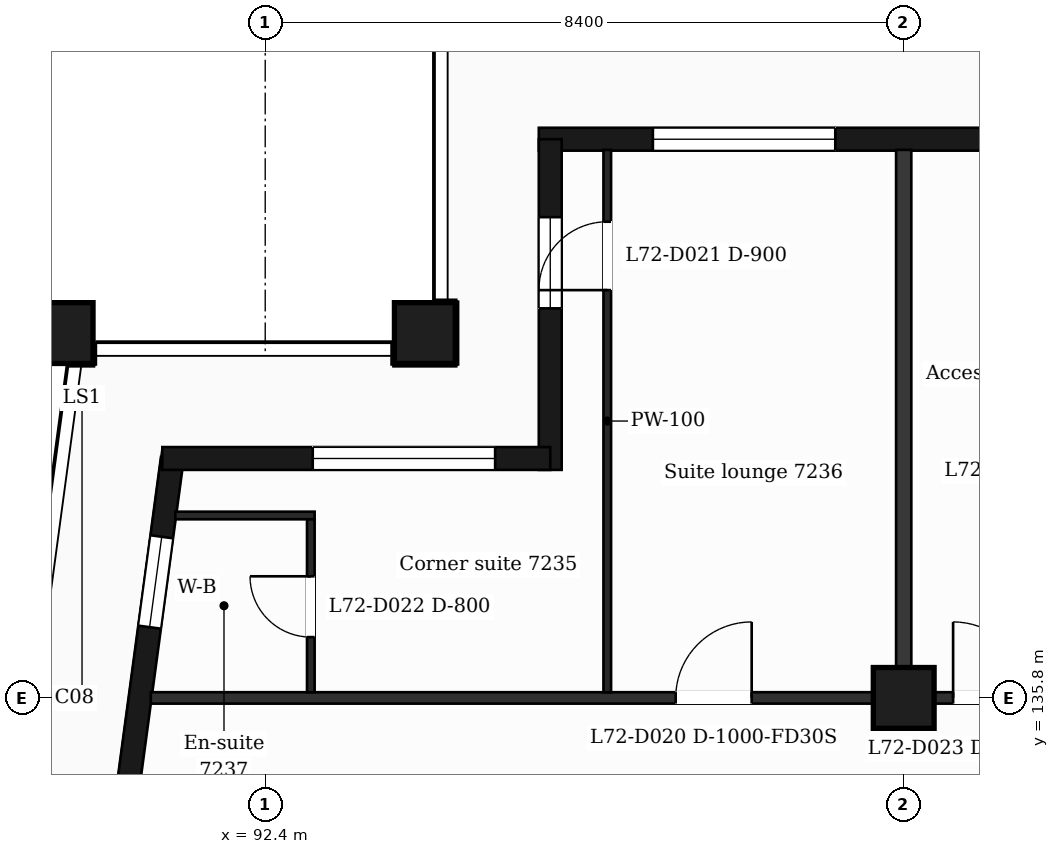
"""IFC4 building model, lengths in metres.
Left out: names, types, materials, properties, quantities, classifications, styles, units other than length and angle.
Written with IfcOpenShell. Run it as: python <this file> out.ifc"""

import sys

from ifc_helpers import new_model, si_unit, direction, frame, frame_2d, origin, origin_2d, place, context, subcontext, project, spatial, rectangle, extrude, element, fill, save


model = new_model("IFC4")
c1 = context("Model", 3, precision=1e-05, world=origin(), true_north=direction((0.0, 1.0)))
c2 = subcontext(c1, "Body", "Model", "MODEL_VIEW")
j1 = project(units=[si_unit("LENGTHUNIT", "METRE"), si_unit("PLANEANGLEUNIT", "RADIAN")], contexts=[c1])
p1 = place(None, origin())
s1 = spatial("IfcSite", under=j1, at=p1, CompositionType="ELEMENT")
p2 = place(p1, origin())
s2 = spatial("IfcBuilding", under=s1, at=p2, CompositionType="ELEMENT")
p3 = place(p2, frame((0.0, 0.0, 296.0)))
s3 = spatial("IfcBuildingStorey", under=s2, at=p3, CompositionType="ELEMENT", Elevation=296.0)
for number, where, z_axis, x_axis in (
    (1, (94.5, 140.6, 0.0), (0.0, 0.0, 1.0), (1.0, 0.0, 0.0)),
    (2, (89.735, 140.6, 0.0), (0.0, 0.0, 1.0), (1.0, 0.0, 0.0)),
    (3, (100.8, 135.8, 0.0), (0.0, 0.0, 1.0), (1.0, 0.0, 0.0)),
):
    element("IfcColumn", number, at=place(p3, frame(where, z_axis=z_axis, x_axis=x_axis)), inside=s3, PredefinedType="COLUMN", context=c2, shape_type="SweptSolid", body=[
        extrude(rectangle(XDim=0.8, YDim=0.8, at=origin_2d()), origin(), (0.0, 0.0, 1.0), 3.7),
    ])
p4 = place(p3, frame((91.177, 138.95, 0.0), z_axis=(0.0, 0.0, 1.0), x_axis=(-0.133426664613, -0.991058689065, 0.0)))
e4 = element("IfcWall", 4, at=p4, inside=s3, PredefinedType="SOLIDWALL", context=c2, shape_type="SweptSolid", body=[
    extrude(rectangle(XDim=6.609, YDim=0.3, at=frame_2d((3.305, 0.0))), origin(), (0.0, 0.0, 1.0), 3.38),
])
p5 = place(p4, frame((1.039, 0.0, 0.9)))
e5 = element("IfcOpeningElement", 5, at=p5, cuts=e4, PredefinedType="OPENING", context=c2, shape_type="SweptSolid", body=[
    extrude(rectangle(XDim=1.2, YDim=2.1, at=frame_2d((0.6, 1.05))), frame((0.0, 0.16, 0.0), z_axis=(0.0, -1.0, 0.0), x_axis=(1.0, 0.0, 0.0)), (0.0, 0.0, 1.0), 0.32),
])
p6 = place(p4, frame((4.294, 0.0, 0.0)))
e6 = element("IfcOpeningElement", 6, at=p6, cuts=e4, PredefinedType="OPENING", context=c2, shape_type="SweptSolid", body=[
    extrude(rectangle(XDim=1.2, YDim=2.4, at=frame_2d((0.6, 1.2))), frame((0.0, 0.16, 0.0), z_axis=(0.0, -1.0, 0.0), x_axis=(1.0, 0.0, 0.0)), (0.0, 0.0, 1.0), 0.32),
])
p7 = place(p3, frame((110.4, 143.15, 0.0), z_axis=(0.0, 0.0, 1.0), x_axis=(-1.0, 0.0, 0.0)))
e7 = element("IfcWall", 7, at=p7, inside=s3, PredefinedType="SOLIDWALL", context=c2, shape_type="SweptSolid", body=[
    extrude(rectangle(XDim=14.4, YDim=0.3, at=frame_2d((7.2, 0.0))), origin(), (0.0, 0.0, 1.0), 3.38),
])
p8 = place(p7, frame((2.7, 0.0, 0.9)))
e8 = element("IfcOpeningElement", 8, at=p8, cuts=e7, PredefinedType="OPENING", context=c2, shape_type="SweptSolid", body=[
    extrude(rectangle(XDim=1.2, YDim=2.1, at=frame_2d((0.6, 1.05))), frame((0.0, 0.16, 0.0), z_axis=(0.0, -1.0, 0.0), x_axis=(1.0, 0.0, 0.0)), (0.0, 0.0, 1.0), 0.32),
])
p9 = place(p7, frame((6.9, 0.0, 0.0)))
e9 = element("IfcOpeningElement", 9, at=p9, cuts=e7, PredefinedType="OPENING", context=c2, shape_type="SweptSolid", body=[
    extrude(rectangle(XDim=1.2, YDim=2.4, at=frame_2d((0.6, 1.2))), frame((0.0, 0.16, 0.0), z_axis=(0.0, -1.0, 0.0), x_axis=(1.0, 0.0, 0.0)), (0.0, 0.0, 1.0), 0.32),
])
p10 = place(p7, frame((10.5, 0.0, 0.9)))
e10 = element("IfcOpeningElement", 10, at=p10, cuts=e7, PredefinedType="OPENING", context=c2, shape_type="SweptSolid", body=[
    extrude(rectangle(XDim=2.4, YDim=2.1, at=frame_2d((1.2, 1.05))), frame((0.0, 0.16, 0.0), z_axis=(0.0, -1.0, 0.0), x_axis=(1.0, 0.0, 0.0)), (0.0, 0.0, 1.0), 0.32),
])
p11 = place(p3, frame((96.15, 143.15, 0.0), z_axis=(0.0, 0.0, 1.0), x_axis=(0.0, -1.0, 0.0)))
e11 = element("IfcWall", 11, at=p11, inside=s3, PredefinedType="SOLIDWALL", context=c2, shape_type="SweptSolid", body=[
    extrude(rectangle(XDim=4.35, YDim=0.3, at=frame_2d((2.175, 0.0))), origin(), (0.0, 0.0, 1.0), 3.38),
])
p12 = place(p11, frame((1.025, 0.0, 0.9)))
e12 = element("IfcOpeningElement", 12, at=p12, cuts=e11, PredefinedType="OPENING", context=c2, shape_type="SweptSolid", body=[
    extrude(rectangle(XDim=1.2, YDim=2.1, at=frame_2d((0.6, 1.05))), frame((0.0, 0.16, 0.0), z_axis=(0.0, -1.0, 0.0), x_axis=(1.0, 0.0, 0.0)), (0.0, 0.0, 1.0), 0.32),
])
p13 = place(p3, frame((96.15, 138.95, 0.0), z_axis=(0.0, 0.0, 1.0), x_axis=(-1.0, 0.0, 0.0)))
e13 = element("IfcWall", 13, at=p13, inside=s3, PredefinedType="SOLIDWALL", context=c2, shape_type="SweptSolid", body=[
    extrude(rectangle(XDim=5.104, YDim=0.3, at=frame_2d((2.552, 0.0))), origin(), (0.0, 0.0, 1.0), 3.38),
])
p14 = place(p13, frame((0.725, 0.0, 0.9)))
e14 = element("IfcOpeningElement", 14, at=p14, cuts=e13, PredefinedType="OPENING", context=c2, shape_type="SweptSolid", body=[
    extrude(rectangle(XDim=2.4, YDim=2.1, at=frame_2d((1.2, 1.05))), frame((0.0, 0.16, 0.0), z_axis=(0.0, -1.0, 0.0), x_axis=(1.0, 0.0, 0.0)), (0.0, 0.0, 1.0), 0.32),
])
p15 = place(p3, frame((90.895, 135.8, 0.0), z_axis=(0.0, 0.0, 1.0), x_axis=(1.0, 0.0, 0.0)))
e15 = element("IfcWall", 15, at=p15, inside=s3, PredefinedType="PARTITIONING", context=c2, shape_type="SweptSolid", body=[
    extrude(rectangle(XDim=45.011, YDim=0.15, at=frame_2d((22.505, 0.0))), origin(), (0.0, 0.0, 1.0), 3.38),
])
p16 = place(p15, frame((6.906, 0.0, 0.0)))
e16 = element("IfcOpeningElement", 16, at=p16, cuts=e15, PredefinedType="OPENING", context=c2, shape_type="SweptSolid", body=[
    extrude(rectangle(XDim=1.0, YDim=2.1, at=frame_2d((0.5, 1.05))), frame((0.0, 0.085, 0.0), z_axis=(0.0, -1.0, 0.0), x_axis=(1.0, 0.0, 0.0)), (0.0, 0.0, 1.0), 0.17),
])
p17 = place(p15, frame((10.555, 0.0, 0.0)))
e17 = element("IfcOpeningElement", 17, at=p17, cuts=e15, PredefinedType="OPENING", context=c2, shape_type="SweptSolid", body=[
    extrude(rectangle(XDim=1.0, YDim=2.1, at=frame_2d((0.5, 1.05))), frame((0.0, 0.085, 0.0), z_axis=(0.0, -1.0, 0.0), x_axis=(1.0, 0.0, 0.0)), (0.0, 0.0, 1.0), 0.17),
])
p18 = place(p15, frame((16.719, 0.0, 0.0)))
e18 = element("IfcOpeningElement", 18, at=p18, cuts=e15, PredefinedType="OPENING", context=c2, shape_type="SweptSolid", body=[
    extrude(rectangle(XDim=0.95, YDim=2.1, at=frame_2d((0.475, 1.05))), frame((0.0, 0.085, 0.0), z_axis=(0.0, -1.0, 0.0), x_axis=(1.0, 0.0, 0.0)), (0.0, 0.0, 1.0), 0.17),
])
p19 = place(p15, frame((21.281, 0.0, 0.0)))
e19 = element("IfcOpeningElement", 19, at=p19, cuts=e15, PredefinedType="OPENING", context=c2, shape_type="SweptSolid", body=[
    extrude(rectangle(XDim=0.95, YDim=2.1, at=frame_2d((0.475, 1.05))), frame((0.0, 0.085, 0.0), z_axis=(0.0, -1.0, 0.0), x_axis=(1.0, 0.0, 0.0)), (0.0, 0.0, 1.0), 0.17),
])
p20 = place(p15, frame((25.125, 0.0, 0.0)))
e20 = element("IfcOpeningElement", 20, at=p20, cuts=e15, PredefinedType="OPENING", context=c2, shape_type="SweptSolid", body=[
    extrude(rectangle(XDim=0.95, YDim=2.1, at=frame_2d((0.475, 1.05))), frame((0.0, 0.085, 0.0), z_axis=(0.0, -1.0, 0.0), x_axis=(1.0, 0.0, 0.0)), (0.0, 0.0, 1.0), 0.17),
])
p21 = place(p15, frame((27.393, 0.0, 0.0)))
e21 = element("IfcOpeningElement", 21, at=p21, cuts=e15, PredefinedType="OPENING", context=c2, shape_type="SweptSolid", body=[
    extrude(rectangle(XDim=0.95, YDim=2.1, at=frame_2d((0.475, 1.05))), frame((0.0, 0.085, 0.0), z_axis=(0.0, -1.0, 0.0), x_axis=(1.0, 0.0, 0.0)), (0.0, 0.0, 1.0), 0.17),
])
p22 = place(p15, frame((33.518, 0.0, 0.0)))
e22 = element("IfcOpeningElement", 22, at=p22, cuts=e15, PredefinedType="OPENING", context=c2, shape_type="SweptSolid", body=[
    extrude(rectangle(XDim=0.95, YDim=2.1, at=frame_2d((0.475, 1.05))), frame((0.0, 0.085, 0.0), z_axis=(0.0, -1.0, 0.0), x_axis=(1.0, 0.0, 0.0)), (0.0, 0.0, 1.0), 0.17),
])
p23 = place(p15, frame((37.615, 0.0, 0.0)))
e23 = element("IfcOpeningElement", 23, at=p23, cuts=e15, PredefinedType="OPENING", context=c2, shape_type="SweptSolid", body=[
    extrude(rectangle(XDim=1.0, YDim=2.1, at=frame_2d((0.5, 1.05))), frame((0.0, 0.085, 0.0), z_axis=(0.0, -1.0, 0.0), x_axis=(1.0, 0.0, 0.0)), (0.0, 0.0, 1.0), 0.17),
])
p24 = place(p3, frame((91.218, 138.2, 0.0), z_axis=(0.0, 0.0, 1.0), x_axis=(1.0, 0.0, 0.0)))
e24 = element("IfcWall", 24, at=p24, inside=s3, PredefinedType="PARTITIONING", context=c2, shape_type="SweptSolid", body=[
    extrude(rectangle(XDim=1.832, YDim=0.1, at=frame_2d((0.916, 0.0))), origin(), (0.0, 0.0, 1.0), 3.38),
])
p25 = place(p3, frame((93.0, 135.875, 0.0), z_axis=(0.0, 0.0, 1.0), x_axis=(0.0, 1.0, 0.0)))
e25 = element("IfcWall", 25, at=p25, inside=s3, PredefinedType="PARTITIONING", context=c2, shape_type="SweptSolid", body=[
    extrude(rectangle(XDim=2.275, YDim=0.1, at=frame_2d((1.137, 0.0))), origin(), (0.0, 0.0, 1.0), 3.38),
])
p26 = place(p25, frame((0.725, 0.0, 0.0)))
e26 = element("IfcOpeningElement", 26, at=p26, cuts=e25, PredefinedType="OPENING", context=c2, shape_type="SweptSolid", body=[
    extrude(rectangle(XDim=0.8, YDim=2.1, at=frame_2d((0.4, 1.05))), frame((0.0, 0.06, 0.0), z_axis=(0.0, -1.0, 0.0), x_axis=(1.0, 0.0, 0.0)), (0.0, 0.0, 1.0), 0.12),
])
p27 = place(p3, frame((96.9, 135.875, 0.0), z_axis=(0.0, 0.0, 1.0), x_axis=(0.0, 1.0, 0.0)))
e27 = element("IfcWall", 27, at=p27, inside=s3, PredefinedType="PARTITIONING", context=c2, shape_type="SweptSolid", body=[
    extrude(rectangle(XDim=7.135, YDim=0.1, at=frame_2d((3.567, 0.0))), origin(), (0.0, 0.0, 1.0), 3.38),
])
p28 = place(p27, frame((5.29, 0.0, 0.0)))
e28 = element("IfcOpeningElement", 28, at=p28, cuts=e27, PredefinedType="OPENING", context=c2, shape_type="SweptSolid", body=[
    extrude(rectangle(XDim=0.9, YDim=2.1, at=frame_2d((0.45, 1.05))), frame((0.0, 0.06, 0.0), z_axis=(0.0, -1.0, 0.0), x_axis=(1.0, 0.0, 0.0)), (0.0, 0.0, 1.0), 0.12),
])
p29 = place(p3, frame((100.8, 135.875, 0.0), z_axis=(0.0, 0.0, 1.0), x_axis=(0.0, 1.0, 0.0)))
e29 = element("IfcWall", 29, at=p29, inside=s3, PredefinedType="PARTITIONING", context=c2, shape_type="SweptSolid", body=[
    extrude(rectangle(XDim=7.135, YDim=0.2, at=frame_2d((3.567, 0.0))), origin(), (0.0, 0.0, 1.0), 3.38),
])
p30 = place(p5, origin())
e30 = element("IfcWindow", 30, at=p30, inside=s3, PartitioningType="SINGLE_PANEL", PredefinedType="WINDOW", context=c2, shape_type="SweptSolid", body=[
    extrude(rectangle(XDim=1.2, YDim=2.1, at=frame_2d((0.6, 1.05))), frame((0.0, 0.03, 0.0), z_axis=(0.0, -1.0, 0.0), x_axis=(1.0, 0.0, 0.0)), (0.0, 0.0, 1.0), 0.06),
])
fill(e5, e30)
p31 = place(p10, origin())
e31 = element("IfcWindow", 31, at=p31, inside=s3, PartitioningType="SINGLE_PANEL", PredefinedType="WINDOW", context=c2, shape_type="SweptSolid", body=[
    extrude(rectangle(XDim=2.4, YDim=2.1, at=frame_2d((1.2, 1.05))), frame((0.0, 0.03, 0.0), z_axis=(0.0, -1.0, 0.0), x_axis=(1.0, 0.0, 0.0)), (0.0, 0.0, 1.0), 0.06),
])
fill(e10, e31)
p32 = place(p12, origin())
e32 = element("IfcWindow", 32, at=p32, inside=s3, PartitioningType="SINGLE_PANEL", PredefinedType="WINDOW", context=c2, shape_type="SweptSolid", body=[
    extrude(rectangle(XDim=1.2, YDim=2.1, at=frame_2d((0.6, 1.05))), frame((0.0, 0.03, 0.0), z_axis=(0.0, -1.0, 0.0), x_axis=(1.0, 0.0, 0.0)), (0.0, 0.0, 1.0), 0.06),
])
fill(e12, e32)
p33 = place(p14, origin())
e33 = element("IfcWindow", 33, at=p33, inside=s3, PartitioningType="SINGLE_PANEL", PredefinedType="WINDOW", context=c2, shape_type="SweptSolid", body=[
    extrude(rectangle(XDim=2.4, YDim=2.1, at=frame_2d((1.2, 1.05))), frame((0.0, 0.03, 0.0), z_axis=(0.0, -1.0, 0.0), x_axis=(1.0, 0.0, 0.0)), (0.0, 0.0, 1.0), 0.06),
])
fill(e14, e33)
p34 = place(p16, origin())
e34 = element("IfcDoor", 34, at=p34, inside=s3, OperationType="SINGLE_SWING_RIGHT", PredefinedType="DOOR", context=c2, shape_type="SweptSolid", body=[
    extrude(rectangle(XDim=1.0, YDim=2.1, at=frame_2d((0.5, 1.05))), frame((0.0, 0.025, 0.0), z_axis=(0.0, -1.0, 0.0), x_axis=(1.0, 0.0, 0.0)), (0.0, 0.0, 1.0), 0.05),
])
fill(e16, e34)
p35 = place(p28, origin())
e35 = element("IfcDoor", 35, at=p35, inside=s3, OperationType="SINGLE_SWING_LEFT", PredefinedType="DOOR", context=c2, shape_type="SweptSolid", body=[
    extrude(rectangle(XDim=0.9, YDim=2.1, at=frame_2d((0.45, 1.05))), frame((0.0, 0.025, 0.0), z_axis=(0.0, -1.0, 0.0), x_axis=(1.0, 0.0, 0.0)), (0.0, 0.0, 1.0), 0.05),
])
fill(e28, e35)
p36 = place(p26, origin())
e36 = element("IfcDoor", 36, at=p36, inside=s3, OperationType="SINGLE_SWING_RIGHT", PredefinedType="DOOR", context=c2, shape_type="SweptSolid", body=[
    extrude(rectangle(XDim=0.8, YDim=2.1, at=frame_2d((0.4, 1.05))), frame((0.0, 0.025, 0.0), z_axis=(0.0, -1.0, 0.0), x_axis=(1.0, 0.0, 0.0)), (0.0, 0.0, 1.0), 0.05),
])
fill(e26, e36)
p37 = place(p17, origin())
e37 = element("IfcDoor", 37, at=p37, inside=s3, OperationType="SINGLE_SWING_LEFT", PredefinedType="DOOR", context=c2, shape_type="SweptSolid", body=[
    extrude(rectangle(XDim=1.0, YDim=2.1, at=frame_2d((0.5, 1.05))), frame((0.0, 0.025, 0.0), z_axis=(0.0, -1.0, 0.0), x_axis=(1.0, 0.0, 0.0)), (0.0, 0.0, 1.0), 0.05),
])
fill(e17, e37)
save(model, sys.argv[1])
